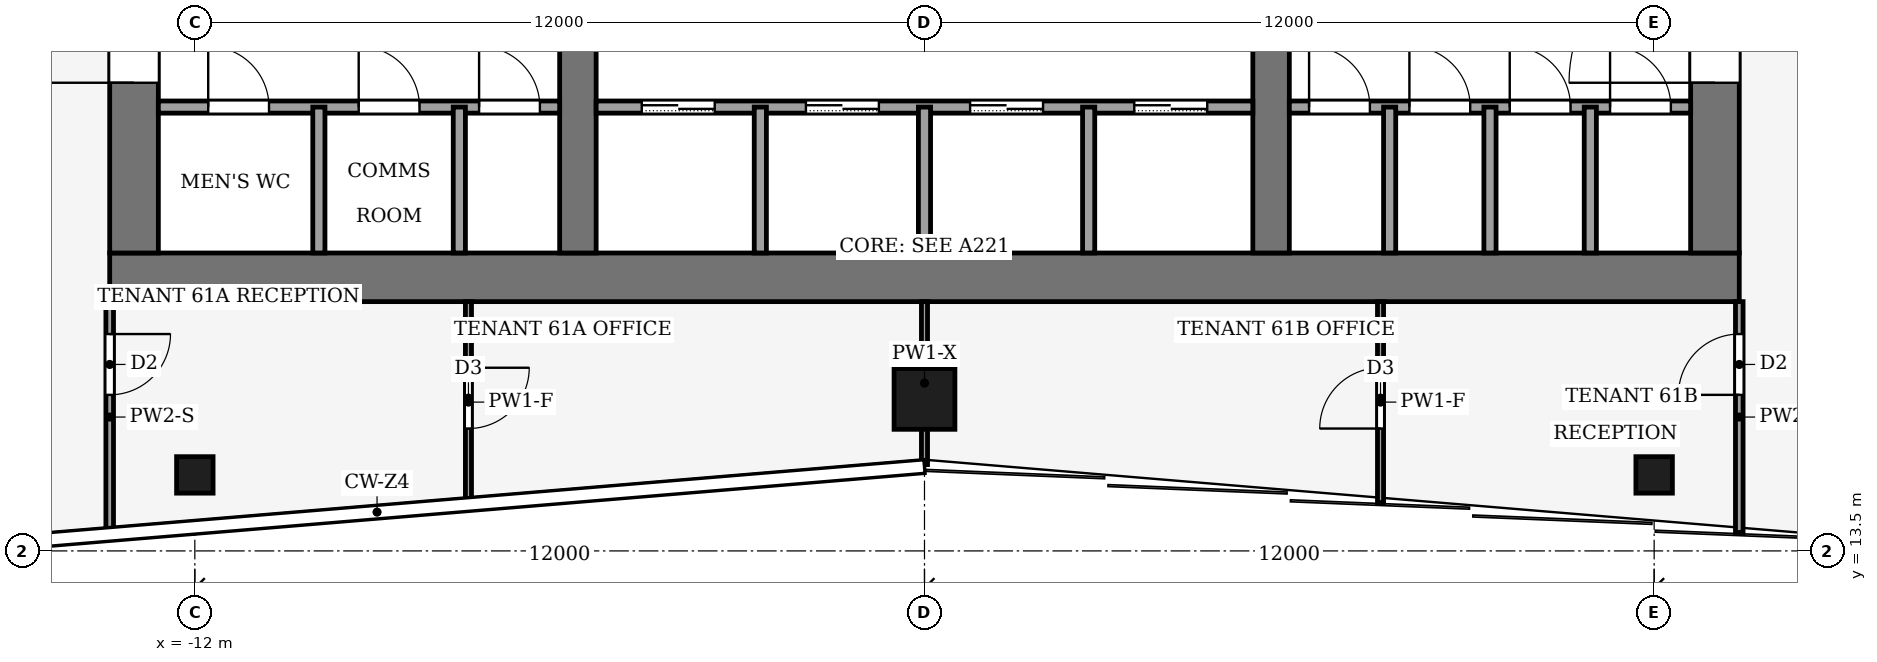
"""IFC4 building model, lengths in metres.
Left out: names, types, materials, properties, quantities, classifications, styles, units other than length and angle.
Written with IfcOpenShell. Run it as: python <this file> out.ifc"""

import sys

from ifc_helpers import new_model, si_unit, direction, frame, frame_2d, origin, origin_2d, place, context, subcontext, project, spatial, rectangle, hollow_rectangle, extrude, element, fill, save


model = new_model("IFC4")
c1 = context("Model", 3, precision=1e-05, world=origin(), true_north=direction((0.0, 1.0)))
c2 = subcontext(c1, "Body", "Model", "MODEL_VIEW")
j1 = project(units=[si_unit("LENGTHUNIT", "METRE"), si_unit("PLANEANGLEUNIT", "RADIAN")], contexts=[c1])
p1 = place(None, origin())
s1 = spatial("IfcSite", under=j1, at=p1, CompositionType="ELEMENT")
p2 = place(p1, origin())
s2 = spatial("IfcBuilding", under=s1, at=p2, CompositionType="ELEMENT")
p3 = place(p2, frame((0.0, 0.0, 266.0)))
s3 = spatial("IfcBuildingStorey", under=s2, at=p3, CompositionType="ELEMENT", Elevation=266.0)
p4 = place(p3, frame((-13.4, 18.0, -0.13), z_axis=(0.0, 0.0, 1.0), x_axis=(1.0, 0.0, 0.0)))
e1 = element("IfcWall", 1, at=p4, inside=s3, PredefinedType="SHEAR", context=c2, shape_type="SweptSolid", body=[
    extrude(rectangle(XDim=26.8, YDim=0.8, at=frame_2d((13.4, 0.0))), origin(), (0.0, 0.0, 1.0), 4.0),
])
p5 = place(p3, frame((-13.0, 18.4, -0.13), z_axis=(0.0, 0.0, 1.0), x_axis=(0.0, 1.0, 0.0)))
e2 = element("IfcWall", 2, at=p5, inside=s3, PredefinedType="SHEAR", context=c2, shape_type="SweptSolid", body=[
    extrude(rectangle(XDim=19.2, YDim=0.8, at=frame_2d((9.6, 0.0))), origin(), (0.0, 0.0, 1.0), 4.0),
])
p6 = place(p5, frame((2.8, 0.0, 0.13)))
e3 = element("IfcOpeningElement", 3, at=p6, cuts=e2, PredefinedType="OPENING", context=c2, shape_type="SweptSolid", body=[
    extrude(rectangle(XDim=2.4, YDim=2.4, at=frame_2d((1.2, 1.2))), frame((0.0, 0.41, 0.0), z_axis=(0.0, -1.0, 0.0), x_axis=(1.0, 0.0, 0.0)), (0.0, 0.0, 1.0), 0.82),
])
p7 = place(p5, frame((13.4, 0.0, 0.13)))
e4 = element("IfcOpeningElement", 4, at=p7, cuts=e2, PredefinedType="OPENING", context=c2, shape_type="SweptSolid", body=[
    extrude(rectangle(XDim=1.4, YDim=2.2, at=frame_2d((0.7, 1.1))), frame((0.0, 0.41, 0.0), z_axis=(0.0, -1.0, 0.0), x_axis=(1.0, 0.0, 0.0)), (0.0, 0.0, 1.0), 0.82),
])
p8 = place(p3, frame((13.0, 18.4, -0.13), z_axis=(0.0, 0.0, 1.0), x_axis=(0.0, 1.0, 0.0)))
e5 = element("IfcWall", 5, at=p8, inside=s3, PredefinedType="SHEAR", context=c2, shape_type="SweptSolid", body=[
    extrude(rectangle(XDim=19.2, YDim=0.8, at=frame_2d((9.6, 0.0))), origin(), (0.0, 0.0, 1.0), 4.0),
])
p9 = place(p8, frame((2.8, 0.0, 0.13)))
e6 = element("IfcOpeningElement", 6, at=p9, cuts=e5, PredefinedType="OPENING", context=c2, shape_type="SweptSolid", body=[
    extrude(rectangle(XDim=2.4, YDim=2.4, at=frame_2d((1.2, 1.2))), frame((0.0, 0.41, 0.0), z_axis=(0.0, -1.0, 0.0), x_axis=(1.0, 0.0, 0.0)), (0.0, 0.0, 1.0), 0.82),
])
p10 = place(p8, frame((13.3, 0.0, 0.13)))
e7 = element("IfcOpeningElement", 7, at=p10, cuts=e5, PredefinedType="OPENING", context=c2, shape_type="SweptSolid", body=[
    extrude(rectangle(XDim=2.4, YDim=2.4, at=frame_2d((1.2, 1.2))), frame((0.0, 0.41, 0.0), z_axis=(0.0, -1.0, 0.0), x_axis=(1.0, 0.0, 0.0)), (0.0, 0.0, 1.0), 0.82),
])
p11 = place(p3, frame((-5.7, 18.4, -0.13), z_axis=(0.0, 0.0, 1.0), x_axis=(0.0, 1.0, 0.0)))
e8 = element("IfcWall", 8, at=p11, inside=s3, PredefinedType="SHEAR", context=c2, shape_type="SweptSolid", body=[
    extrude(rectangle(XDim=19.2, YDim=0.6, at=frame_2d((9.6, 0.0))), origin(), (0.0, 0.0, 1.0), 4.0),
])
p12 = place(p11, frame((8.35, 0.0, 0.13)))
e9 = element("IfcOpeningElement", 9, at=p12, cuts=e8, PredefinedType="OPENING", context=c2, shape_type="SweptSolid", body=[
    extrude(rectangle(XDim=0.9, YDim=2.1, at=frame_2d((0.45, 1.05))), frame((0.0, 0.31, 0.0), z_axis=(0.0, -1.0, 0.0), x_axis=(1.0, 0.0, 0.0)), (0.0, 0.0, 1.0), 0.62),
])
p13 = place(p3, frame((5.7, 18.4, -0.13), z_axis=(0.0, 0.0, 1.0), x_axis=(0.0, 1.0, 0.0)))
e10 = element("IfcWall", 10, at=p13, inside=s3, PredefinedType="SHEAR", context=c2, shape_type="SweptSolid", body=[
    extrude(rectangle(XDim=19.2, YDim=0.6, at=frame_2d((9.6, 0.0))), origin(), (0.0, 0.0, 1.0), 4.0),
])
p14 = place(p13, frame((13.3, 0.0, 0.13)))
e11 = element("IfcOpeningElement", 11, at=p14, cuts=e10, PredefinedType="OPENING", context=c2, shape_type="SweptSolid", body=[
    extrude(rectangle(XDim=2.4, YDim=2.4, at=frame_2d((1.2, 1.2))), frame((0.0, 0.31, 0.0), z_axis=(0.0, -1.0, 0.0), x_axis=(1.0, 0.0, 0.0)), (0.0, 0.0, 1.0), 0.62),
])
p15 = place(p3, frame((0.0, 16.0, 0.0), z_axis=(0.0, 0.0, 1.0), x_axis=(1.0, 0.0, 0.0)))
e12 = element("IfcColumn", 12, at=p15, inside=s3, PredefinedType="COLUMN", context=c2, shape_type="SweptSolid", body=[
    extrude(hollow_rectangle(XDim=1.0, YDim=1.0, WallThickness=0.045, at=origin_2d()), origin(), (0.0, 0.0, 1.0), 4.0),
])
for number, where, z_axis, x_axis in (
    (13, (-12.0, 14.75, 0.0), (0.0, 0.0, 1.0), (1.0, 0.0, 0.0)),
    (14, (12.0, 14.75, 0.0), (0.0, 0.0, 1.0), (1.0, 0.0, 0.0)),
):
    element("IfcColumn", number, at=place(p3, frame(where, z_axis=z_axis, x_axis=x_axis)), inside=s3, PredefinedType="COLUMN", context=c2, shape_type="SweptSolid", body=[
        extrude(hollow_rectangle(XDim=0.6, YDim=0.6, WallThickness=0.025, at=origin_2d()), origin(), (0.0, 0.0, 1.0), 4.0),
    ])
p16 = place(p3, frame((-12.6, 20.8, 0.0), z_axis=(0.0, 0.0, 1.0), x_axis=(1.0, 0.0, 0.0)))
e15 = element("IfcWall", 15, at=p16, inside=s3, PredefinedType="PARTITIONING", context=c2, shape_type="SweptSolid", body=[
    extrude(rectangle(XDim=6.6, YDim=0.2, at=frame_2d((3.3, 0.0))), origin(), (0.0, 0.0, 1.0), 3.87),
])
p17 = place(p16, frame((0.82, 0.0, 0.0)))
e16 = element("IfcOpeningElement", 16, at=p17, cuts=e15, PredefinedType="OPENING", context=c2, shape_type="SweptSolid", body=[
    extrude(rectangle(XDim=1.0, YDim=2.1, at=frame_2d((0.5, 1.05))), frame((0.0, 0.11, 0.0), z_axis=(0.0, -1.0, 0.0), x_axis=(1.0, 0.0, 0.0)), (0.0, 0.0, 1.0), 0.22),
])
p18 = place(p16, frame((3.295, 0.0, 0.0)))
e17 = element("IfcOpeningElement", 17, at=p18, cuts=e15, PredefinedType="OPENING", context=c2, shape_type="SweptSolid", body=[
    extrude(rectangle(XDim=1.0, YDim=2.1, at=frame_2d((0.5, 1.05))), frame((0.0, 0.11, 0.0), z_axis=(0.0, -1.0, 0.0), x_axis=(1.0, 0.0, 0.0)), (0.0, 0.0, 1.0), 0.22),
])
p19 = place(p16, frame((5.275, 0.0, 0.0)))
e18 = element("IfcOpeningElement", 18, at=p19, cuts=e15, PredefinedType="OPENING", context=c2, shape_type="SweptSolid", body=[
    extrude(rectangle(XDim=1.0, YDim=2.1, at=frame_2d((0.5, 1.05))), frame((0.0, 0.11, 0.0), z_axis=(0.0, -1.0, 0.0), x_axis=(1.0, 0.0, 0.0)), (0.0, 0.0, 1.0), 0.22),
])
p20 = place(p3, frame((-5.4, 20.8, 0.0), z_axis=(0.0, 0.0, 1.0), x_axis=(1.0, 0.0, 0.0)))
e19 = element("IfcWall", 19, at=p20, inside=s3, PredefinedType="PARTITIONING", context=c2, shape_type="SweptSolid", body=[
    extrude(rectangle(XDim=10.8, YDim=0.2, at=frame_2d((5.4, 0.0))), origin(), (0.0, 0.0, 1.0), 3.87),
])
p21 = place(p20, frame((0.75, 0.0, 0.0)))
e20 = element("IfcOpeningElement", 20, at=p21, cuts=e19, PredefinedType="OPENING", context=c2, shape_type="SweptSolid", body=[
    extrude(rectangle(XDim=1.2, YDim=2.2, at=frame_2d((0.6, 1.1))), frame((0.0, 0.11, 0.0), z_axis=(0.0, -1.0, 0.0), x_axis=(1.0, 0.0, 0.0)), (0.0, 0.0, 1.0), 0.22),
])
p22 = place(p20, frame((3.45, 0.0, 0.0)))
e21 = element("IfcOpeningElement", 21, at=p22, cuts=e19, PredefinedType="OPENING", context=c2, shape_type="SweptSolid", body=[
    extrude(rectangle(XDim=1.2, YDim=2.2, at=frame_2d((0.6, 1.1))), frame((0.0, 0.11, 0.0), z_axis=(0.0, -1.0, 0.0), x_axis=(1.0, 0.0, 0.0)), (0.0, 0.0, 1.0), 0.22),
])
p23 = place(p20, frame((6.15, 0.0, 0.0)))
e22 = element("IfcOpeningElement", 22, at=p23, cuts=e19, PredefinedType="OPENING", context=c2, shape_type="SweptSolid", body=[
    extrude(rectangle(XDim=1.2, YDim=2.2, at=frame_2d((0.6, 1.1))), frame((0.0, 0.11, 0.0), z_axis=(0.0, -1.0, 0.0), x_axis=(1.0, 0.0, 0.0)), (0.0, 0.0, 1.0), 0.22),
])
p24 = place(p20, frame((8.85, 0.0, 0.0)))
e23 = element("IfcOpeningElement", 23, at=p24, cuts=e19, PredefinedType="OPENING", context=c2, shape_type="SweptSolid", body=[
    extrude(rectangle(XDim=1.2, YDim=2.2, at=frame_2d((0.6, 1.1))), frame((0.0, 0.11, 0.0), z_axis=(0.0, -1.0, 0.0), x_axis=(1.0, 0.0, 0.0)), (0.0, 0.0, 1.0), 0.22),
])
p25 = place(p3, frame((6.0, 20.8, 0.0), z_axis=(0.0, 0.0, 1.0), x_axis=(1.0, 0.0, 0.0)))
e24 = element("IfcWall", 24, at=p25, inside=s3, PredefinedType="PARTITIONING", context=c2, shape_type="SweptSolid", body=[
    extrude(rectangle(XDim=6.6, YDim=0.2, at=frame_2d((3.3, 0.0))), origin(), (0.0, 0.0, 1.0), 3.87),
])
p26 = place(p25, frame((0.325, 0.0, 0.0)))
e25 = element("IfcOpeningElement", 25, at=p26, cuts=e24, PredefinedType="OPENING", context=c2, shape_type="SweptSolid", body=[
    extrude(rectangle(XDim=1.0, YDim=2.1, at=frame_2d((0.5, 1.05))), frame((0.0, 0.11, 0.0), z_axis=(0.0, -1.0, 0.0), x_axis=(1.0, 0.0, 0.0)), (0.0, 0.0, 1.0), 0.22),
])
p27 = place(p25, frame((1.975, 0.0, 0.0)))
e26 = element("IfcOpeningElement", 26, at=p27, cuts=e24, PredefinedType="OPENING", context=c2, shape_type="SweptSolid", body=[
    extrude(rectangle(XDim=1.0, YDim=2.1, at=frame_2d((0.5, 1.05))), frame((0.0, 0.11, 0.0), z_axis=(0.0, -1.0, 0.0), x_axis=(1.0, 0.0, 0.0)), (0.0, 0.0, 1.0), 0.22),
])
p28 = place(p25, frame((3.625, 0.0, 0.0)))
e27 = element("IfcOpeningElement", 27, at=p28, cuts=e24, PredefinedType="OPENING", context=c2, shape_type="SweptSolid", body=[
    extrude(rectangle(XDim=1.0, YDim=2.1, at=frame_2d((0.5, 1.05))), frame((0.0, 0.11, 0.0), z_axis=(0.0, -1.0, 0.0), x_axis=(1.0, 0.0, 0.0)), (0.0, 0.0, 1.0), 0.22),
])
p29 = place(p25, frame((5.275, 0.0, 0.0)))
e28 = element("IfcOpeningElement", 28, at=p29, cuts=e24, PredefinedType="OPENING", context=c2, shape_type="SweptSolid", body=[
    extrude(rectangle(XDim=1.0, YDim=2.1, at=frame_2d((0.5, 1.05))), frame((0.0, 0.11, 0.0), z_axis=(0.0, -1.0, 0.0), x_axis=(1.0, 0.0, 0.0)), (0.0, 0.0, 1.0), 0.22),
])
for number, where, z_axis, x_axis in (
    (29, (-9.96, 18.4, 0.0), (0.0, 0.0, 1.0), (0.0, 1.0, 0.0)),
    (30, (-7.65, 18.4, 0.0), (0.0, 0.0, 1.0), (0.0, 1.0, 0.0)),
    (31, (-2.7, 18.4, 0.0), (0.0, 0.0, 1.0), (0.0, 1.0, 0.0)),
    (32, (0.0, 18.4, 0.0), (0.0, 0.0, 1.0), (0.0, 1.0, 0.0)),
    (33, (2.7, 18.4, 0.0), (0.0, 0.0, 1.0), (0.0, 1.0, 0.0)),
    (34, (7.65, 18.4, 0.0), (0.0, 0.0, 1.0), (0.0, 1.0, 0.0)),
    (35, (9.3, 18.4, 0.0), (0.0, 0.0, 1.0), (0.0, 1.0, 0.0)),
    (36, (10.95, 18.4, 0.0), (0.0, 0.0, 1.0), (0.0, 1.0, 0.0)),
):
    element("IfcWall", number, at=place(p3, frame(where, z_axis=z_axis, x_axis=x_axis)), inside=s3, PredefinedType="PARTITIONING", context=c2, shape_type="SweptSolid", body=[
        extrude(rectangle(XDim=2.4, YDim=0.2, at=frame_2d((1.2, 0.0))), origin(), (0.0, 0.0, 1.0), 3.87),
    ])
p30 = place(p3, frame((-13.4, 17.6, 0.0), z_axis=(0.0, 0.0, 1.0), x_axis=(0.0, -1.0, 0.0)))
e37 = element("IfcWall", 37, at=p30, inside=s3, PredefinedType="PARTITIONING", context=c2, shape_type="SweptSolid", body=[
    extrude(rectangle(XDim=3.797, YDim=0.125, at=frame_2d((1.898, 0.0))), origin(), (0.0, 0.0, 1.0), 3.04),
])
p31 = place(p30, frame((0.533, 0.0, 0.0)))
e38 = element("IfcOpeningElement", 38, at=p31, cuts=e37, PredefinedType="OPENING", context=c2, shape_type="SweptSolid", body=[
    extrude(rectangle(XDim=1.0, YDim=2.1, at=frame_2d((0.5, 1.05))), frame((0.0, 0.073, 0.0), z_axis=(0.0, -1.0, 0.0), x_axis=(1.0, 0.0, 0.0)), (0.0, 0.0, 1.0), 0.145),
])
p32 = place(p3, frame((13.4, 13.803, 0.0), z_axis=(0.0, 0.0, 1.0), x_axis=(0.0, 1.0, 0.0)))
e39 = element("IfcWall", 39, at=p32, inside=s3, PredefinedType="PARTITIONING", context=c2, shape_type="SweptSolid", body=[
    extrude(rectangle(XDim=3.797, YDim=0.125, at=frame_2d((1.898, 0.0))), origin(), (0.0, 0.0, 1.0), 3.04),
])
p33 = place(p32, frame((2.263, 0.0, 0.0)))
e40 = element("IfcOpeningElement", 40, at=p33, cuts=e39, PredefinedType="OPENING", context=c2, shape_type="SweptSolid", body=[
    extrude(rectangle(XDim=1.0, YDim=2.1, at=frame_2d((0.5, 1.05))), frame((0.0, 0.073, 0.0), z_axis=(0.0, -1.0, 0.0), x_axis=(1.0, 0.0, 0.0)), (0.0, 0.0, 1.0), 0.145),
])
p34 = place(p3, frame((-7.5, 17.6, 0.0), z_axis=(0.0, 0.0, 1.0), x_axis=(0.0, -1.0, 0.0)))
e41 = element("IfcWall", 41, at=p34, inside=s3, PredefinedType="PARTITIONING", context=c2, shape_type="SweptSolid", body=[
    extrude(rectangle(XDim=3.305, YDim=0.1, at=frame_2d((1.653, 0.0))), origin(), (0.0, 0.0, 1.0), 3.04),
])
p35 = place(p34, frame((1.087, 0.0, 0.0)))
e42 = element("IfcOpeningElement", 42, at=p35, cuts=e41, PredefinedType="OPENING", context=c2, shape_type="SweptSolid", body=[
    extrude(rectangle(XDim=1.0, YDim=2.1, at=frame_2d((0.5, 1.05))), frame((0.0, 0.06, 0.0), z_axis=(0.0, -1.0, 0.0), x_axis=(1.0, 0.0, 0.0)), (0.0, 0.0, 1.0), 0.12),
])
p36 = place(p3, frame((0.0, 14.92, 0.0), z_axis=(0.0, 0.0, 1.0), x_axis=(0.0, 1.0, 0.0)))
e43 = element("IfcWall", 43, at=p36, inside=s3, PredefinedType="PARTITIONING", context=c2, shape_type="SweptSolid", body=[
    extrude(rectangle(XDim=2.68, YDim=0.1, at=frame_2d((1.34, 0.0))), origin(), (0.0, 0.0, 1.0), 3.54),
])
p37 = place(p3, frame((7.5, 14.295, 0.0), z_axis=(0.0, 0.0, 1.0), x_axis=(0.0, 1.0, 0.0)))
e44 = element("IfcWall", 44, at=p37, inside=s3, PredefinedType="PARTITIONING", context=c2, shape_type="SweptSolid", body=[
    extrude(rectangle(XDim=3.305, YDim=0.1, at=frame_2d((1.653, 0.0))), origin(), (0.0, 0.0, 1.0), 3.04),
])
p38 = place(p37, frame((1.218, 0.0, 0.0)))
e45 = element("IfcOpeningElement", 45, at=p38, cuts=e44, PredefinedType="OPENING", context=c2, shape_type="SweptSolid", body=[
    extrude(rectangle(XDim=1.0, YDim=2.1, at=frame_2d((0.5, 1.05))), frame((0.0, 0.06, 0.0), z_axis=(0.0, -1.0, 0.0), x_axis=(1.0, 0.0, 0.0)), (0.0, 0.0, 1.0), 0.12),
])
p39 = place(p21, origin())
e46 = element("IfcDoor", 46, at=p39, inside=s3, OperationType="SLIDING_TO_LEFT", PredefinedType="DOOR", context=c2, shape_type="SweptSolid", body=[
    extrude(rectangle(XDim=1.2, YDim=2.2, at=frame_2d((0.6, 1.1))), frame((0.0, 0.025, 0.0), z_axis=(0.0, -1.0, 0.0), x_axis=(1.0, 0.0, 0.0)), (0.0, 0.0, 1.0), 0.05),
])
fill(e20, e46)
p40 = place(p22, origin())
e47 = element("IfcDoor", 47, at=p40, inside=s3, OperationType="SLIDING_TO_LEFT", PredefinedType="DOOR", context=c2, shape_type="SweptSolid", body=[
    extrude(rectangle(XDim=1.2, YDim=2.2, at=frame_2d((0.6, 1.1))), frame((0.0, 0.025, 0.0), z_axis=(0.0, -1.0, 0.0), x_axis=(1.0, 0.0, 0.0)), (0.0, 0.0, 1.0), 0.05),
])
fill(e21, e47)
p41 = place(p23, origin())
e48 = element("IfcDoor", 48, at=p41, inside=s3, OperationType="SLIDING_TO_LEFT", PredefinedType="DOOR", context=c2, shape_type="SweptSolid", body=[
    extrude(rectangle(XDim=1.2, YDim=2.2, at=frame_2d((0.6, 1.1))), frame((0.0, 0.025, 0.0), z_axis=(0.0, -1.0, 0.0), x_axis=(1.0, 0.0, 0.0)), (0.0, 0.0, 1.0), 0.05),
])
fill(e22, e48)
p42 = place(p24, origin())
e49 = element("IfcDoor", 49, at=p42, inside=s3, OperationType="SLIDING_TO_LEFT", PredefinedType="DOOR", context=c2, shape_type="SweptSolid", body=[
    extrude(rectangle(XDim=1.2, YDim=2.2, at=frame_2d((0.6, 1.1))), frame((0.0, 0.025, 0.0), z_axis=(0.0, -1.0, 0.0), x_axis=(1.0, 0.0, 0.0)), (0.0, 0.0, 1.0), 0.05),
])
fill(e23, e49)
p43 = place(p17, origin())
e50 = element("IfcDoor", 50, at=p43, inside=s3, OperationType="SINGLE_SWING_LEFT", PredefinedType="DOOR", context=c2, shape_type="SweptSolid", body=[
    extrude(rectangle(XDim=1.0, YDim=2.1, at=frame_2d((0.5, 1.05))), frame((0.0, 0.025, 0.0), z_axis=(0.0, -1.0, 0.0), x_axis=(1.0, 0.0, 0.0)), (0.0, 0.0, 1.0), 0.05),
])
fill(e16, e50)
p44 = place(p18, origin())
e51 = element("IfcDoor", 51, at=p44, inside=s3, OperationType="SINGLE_SWING_LEFT", PredefinedType="DOOR", context=c2, shape_type="SweptSolid", body=[
    extrude(rectangle(XDim=1.0, YDim=2.1, at=frame_2d((0.5, 1.05))), frame((0.0, 0.025, 0.0), z_axis=(0.0, -1.0, 0.0), x_axis=(1.0, 0.0, 0.0)), (0.0, 0.0, 1.0), 0.05),
])
fill(e17, e51)
p45 = place(p19, origin())
e52 = element("IfcDoor", 52, at=p45, inside=s3, OperationType="SINGLE_SWING_RIGHT", PredefinedType="DOOR", context=c2, shape_type="SweptSolid", body=[
    extrude(rectangle(XDim=1.0, YDim=2.1, at=frame_2d((0.5, 1.05))), frame((0.0, 0.025, 0.0), z_axis=(0.0, -1.0, 0.0), x_axis=(1.0, 0.0, 0.0)), (0.0, 0.0, 1.0), 0.05),
])
fill(e18, e52)
p46 = place(p26, origin())
e53 = element("IfcDoor", 53, at=p46, inside=s3, OperationType="SINGLE_SWING_LEFT", PredefinedType="DOOR", context=c2, shape_type="SweptSolid", body=[
    extrude(rectangle(XDim=1.0, YDim=2.1, at=frame_2d((0.5, 1.05))), frame((0.0, 0.025, 0.0), z_axis=(0.0, -1.0, 0.0), x_axis=(1.0, 0.0, 0.0)), (0.0, 0.0, 1.0), 0.05),
])
fill(e25, e53)
p47 = place(p27, origin())
e54 = element("IfcDoor", 54, at=p47, inside=s3, OperationType="SINGLE_SWING_LEFT", PredefinedType="DOOR", context=c2, shape_type="SweptSolid", body=[
    extrude(rectangle(XDim=1.0, YDim=2.1, at=frame_2d((0.5, 1.05))), frame((0.0, 0.025, 0.0), z_axis=(0.0, -1.0, 0.0), x_axis=(1.0, 0.0, 0.0)), (0.0, 0.0, 1.0), 0.05),
])
fill(e26, e54)
p48 = place(p28, origin())
e55 = element("IfcDoor", 55, at=p48, inside=s3, OperationType="SINGLE_SWING_RIGHT", PredefinedType="DOOR", context=c2, shape_type="SweptSolid", body=[
    extrude(rectangle(XDim=1.0, YDim=2.1, at=frame_2d((0.5, 1.05))), frame((0.0, 0.025, 0.0), z_axis=(0.0, -1.0, 0.0), x_axis=(1.0, 0.0, 0.0)), (0.0, 0.0, 1.0), 0.05),
])
fill(e27, e55)
p49 = place(p29, origin())
e56 = element("IfcDoor", 56, at=p49, inside=s3, OperationType="SINGLE_SWING_RIGHT", PredefinedType="DOOR", context=c2, shape_type="SweptSolid", body=[
    extrude(rectangle(XDim=1.0, YDim=2.1, at=frame_2d((0.5, 1.05))), frame((0.0, 0.025, 0.0), z_axis=(0.0, -1.0, 0.0), x_axis=(1.0, 0.0, 0.0)), (0.0, 0.0, 1.0), 0.05),
])
fill(e28, e56)
p50 = place(p6, origin())
e57 = element("IfcDoor", 57, at=p50, inside=s3, OperationType="DOUBLE_DOOR_SINGLE_SWING", PredefinedType="DOOR", context=c2, shape_type="SweptSolid", body=[
    extrude(rectangle(XDim=2.4, YDim=2.4, at=frame_2d((1.2, 1.2))), frame((0.0, 0.025, 0.0), z_axis=(0.0, -1.0, 0.0), x_axis=(1.0, 0.0, 0.0)), (0.0, 0.0, 1.0), 0.05),
])
fill(e3, e57)
p51 = place(p9, origin())
e58 = element("IfcDoor", 58, at=p51, inside=s3, OperationType="DOUBLE_DOOR_SINGLE_SWING", PredefinedType="DOOR", context=c2, shape_type="SweptSolid", body=[
    extrude(rectangle(XDim=2.4, YDim=2.4, at=frame_2d((1.2, 1.2))), frame((0.0, 0.025, 0.0), z_axis=(0.0, -1.0, 0.0), x_axis=(1.0, 0.0, 0.0)), (0.0, 0.0, 1.0), 0.05),
])
fill(e6, e58)
p52 = place(p31, origin())
e59 = element("IfcDoor", 59, at=p52, inside=s3, OperationType="SINGLE_SWING_LEFT", PredefinedType="DOOR", context=c2, shape_type="SweptSolid", body=[
    extrude(rectangle(XDim=1.0, YDim=2.1, at=frame_2d((0.5, 1.05))), frame((0.0, 0.025, 0.0), z_axis=(0.0, -1.0, 0.0), x_axis=(1.0, 0.0, 0.0)), (0.0, 0.0, 1.0), 0.05),
])
fill(e38, e59)
p53 = place(p33, origin())
e60 = element("IfcDoor", 60, at=p53, inside=s3, OperationType="SINGLE_SWING_RIGHT", PredefinedType="DOOR", context=c2, shape_type="SweptSolid", body=[
    extrude(rectangle(XDim=1.0, YDim=2.1, at=frame_2d((0.5, 1.05))), frame((0.0, 0.025, 0.0), z_axis=(0.0, -1.0, 0.0), x_axis=(1.0, 0.0, 0.0)), (0.0, 0.0, 1.0), 0.05),
])
fill(e40, e60)
p54 = place(p35, origin())
e61 = element("IfcDoor", 61, at=p54, inside=s3, OperationType="SINGLE_SWING_LEFT", PredefinedType="DOOR", context=c2, shape_type="SweptSolid", body=[
    extrude(rectangle(XDim=1.0, YDim=2.1, at=frame_2d((0.5, 1.05))), frame((0.0, 0.025, 0.0), z_axis=(0.0, -1.0, 0.0), x_axis=(1.0, 0.0, 0.0)), (0.0, 0.0, 1.0), 0.05),
])
fill(e42, e61)
p55 = place(p38, origin())
e62 = element("IfcDoor", 62, at=p55, inside=s3, OperationType="SINGLE_SWING_RIGHT", PredefinedType="DOOR", context=c2, shape_type="SweptSolid", body=[
    extrude(rectangle(XDim=1.0, YDim=2.1, at=frame_2d((0.5, 1.05))), frame((0.0, 0.025, 0.0), z_axis=(0.0, -1.0, 0.0), x_axis=(1.0, 0.0, 0.0)), (0.0, 0.0, 1.0), 0.05),
])
fill(e45, e62)
save(model, sys.argv[1])
